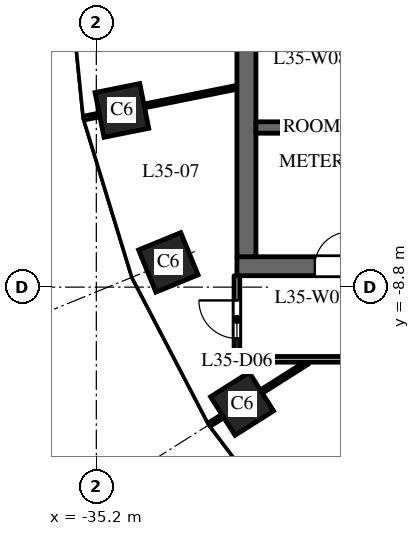
"""IFC4 building model, lengths in metres.
Left out: names, types, materials, properties, quantities, classifications, styles, units other than length and angle.
Written with IfcOpenShell. Run it as: python <this file> out.ifc"""

import sys

from ifc_helpers import new_model, si_unit, direction, frame, frame_2d, origin, origin_2d, place, context, subcontext, project, spatial, rectangle, extrude, element, fill, save


model = new_model("IFC4")
c1 = context("Model", 3, precision=1e-05, world=origin(), true_north=direction((0.0, 1.0)))
c2 = subcontext(c1, "Body", "Model", "MODEL_VIEW")
j1 = project(units=[si_unit("LENGTHUNIT", "METRE"), si_unit("PLANEANGLEUNIT", "RADIAN")], contexts=[c1])
p1 = place(None, origin())
s1 = spatial("IfcSite", under=j1, at=p1, CompositionType="ELEMENT")
p2 = place(p1, origin())
s2 = spatial("IfcBuilding", under=s1, at=p2, CompositionType="ELEMENT")
p3 = place(p2, frame((0.0, 0.0, 154.0)))
s3 = spatial("IfcBuildingStorey", under=s2, at=p3, CompositionType="ELEMENT", Elevation=154.0)
for number, where, z_axis, x_axis in (
    (1, (-34.527, -4.151, 0.0), (0.0, 0.0, 1.0), (0.197, -0.98, 0.0)),
    (2, (-33.305, -8.149, 0.0), (0.0, 0.0, 1.0), (0.379, -0.925, 0.0)),
    (3, (-31.365, -11.871, 0.0), (0.0, 0.0, 1.0), (0.535, -0.845, 0.0)),
):
    element("IfcColumn", number, at=place(p3, frame(where, z_axis=z_axis, x_axis=x_axis)), inside=s3, PredefinedType="COLUMN", context=c2, shape_type="SweptSolid", body=[
        extrude(rectangle(XDim=1.2, YDim=1.2, at=origin_2d()), origin(), (0.0, 0.0, 1.0), 4.0),
    ])
p4 = place(p3, frame((-16.5, -8.25, 0.0), z_axis=(0.0, 0.0, 1.0), x_axis=(-1.0, 0.0, 0.0)))
e4 = element("IfcWall", 4, at=p4, inside=s3, PredefinedType="SHEAR", context=c2, shape_type="SweptSolid", body=[
    extrude(rectangle(XDim=15.0, YDim=0.5, at=frame_2d((7.5, 0.0))), origin(), (0.0, 0.0, 1.0), 3.7),
])
p5 = place(p4, frame((6.9, 0.0, 0.0)))
e5 = element("IfcOpeningElement", 5, at=p5, cuts=e4, PredefinedType="OPENING", context=c2, shape_type="SweptSolid", body=[
    extrude(rectangle(XDim=1.2, YDim=2.1, at=frame_2d((0.6, 1.05))), frame((0.0, 0.26, 0.0), z_axis=(0.0, -1.0, 0.0), x_axis=(1.0, 0.0, 0.0)), (0.0, 0.0, 1.0), 0.52),
])
p6 = place(p4, frame((12.05, 0.0, 0.0)))
e6 = element("IfcOpeningElement", 6, at=p6, cuts=e4, PredefinedType="OPENING", context=c2, shape_type="SweptSolid", body=[
    extrude(rectangle(XDim=0.9, YDim=2.1, at=frame_2d((0.45, 1.05))), frame((0.0, 0.26, 0.0), z_axis=(0.0, -1.0, 0.0), x_axis=(1.0, 0.0, 0.0)), (0.0, 0.0, 1.0), 0.52),
])
p7 = place(p3, frame((-31.25, -8.0, 0.0), z_axis=(0.0, 0.0, 1.0), x_axis=(0.0, 1.0, 0.0)))
e7 = element("IfcWall", 7, at=p7, inside=s3, PredefinedType="SHEAR", context=c2, shape_type="SweptSolid", body=[
    extrude(rectangle(XDim=16.0, YDim=0.5, at=frame_2d((8.0, 0.0))), origin(), (0.0, 0.0, 1.0), 3.7),
])
p8 = place(p3, frame((-24.9, -4.6, 0.0), z_axis=(0.0, 0.0, 1.0), x_axis=(-1.0, 0.0, 0.0)))
e8 = element("IfcWall", 8, at=p8, inside=s3, PredefinedType="SHEAR", context=c2, shape_type="SweptSolid", body=[
    extrude(rectangle(XDim=6.1, YDim=0.3, at=frame_2d((3.05, 0.0))), origin(), (0.0, 0.0, 1.0), 3.7),
])
p9 = place(p3, frame((-35.512, -4.349, 0.0), z_axis=(0.0, 0.0, 1.0), x_axis=(0.980357474535, 0.197228857227, 0.0)))
e9 = element("IfcWall", 9, at=p9, inside=s3, PredefinedType="PARTITIONING", context=c2, shape_type="SweptSolid", body=[
    extrude(rectangle(XDim=4.092, YDim=0.1, at=frame_2d((2.046, 0.0))), origin(), (0.0, 0.0, 1.0), 3.2),
])
p10 = place(p3, frame((-32.212, -12.408, 0.0), z_axis=(0.0, 0.0, 1.0), x_axis=(0.844810627195, 0.535065420467, 0.0)))
e10 = element("IfcWall", 10, at=p10, inside=s3, PredefinedType="PARTITIONING", context=c2, shape_type="SweptSolid", body=[
    extrude(rectangle(XDim=3.048, YDim=0.1, at=frame_2d((1.524, 0.0))), origin(), (0.0, 0.0, 1.0), 3.7),
])
p11 = place(p3, frame((-31.5, -10.7, 0.0), z_axis=(0.0, 0.0, 1.0), x_axis=(0.0, 1.0, 0.0)))
e11 = element("IfcWall", 11, at=p11, inside=s3, PredefinedType="PARTITIONING", context=c2, shape_type="SweptSolid", body=[
    extrude(rectangle(XDim=2.2, YDim=0.15, at=frame_2d((1.1, 0.0))), origin(), (0.0, 0.0, 1.0), 3.7),
])
p12 = place(p11, frame((0.55, 0.0, 0.0)))
e12 = element("IfcOpeningElement", 12, at=p12, cuts=e11, PredefinedType="OPENING", context=c2, shape_type="SweptSolid", body=[
    extrude(rectangle(XDim=1.0, YDim=2.1, at=frame_2d((0.5, 1.05))), frame((0.0, 0.085, 0.0), z_axis=(0.0, -1.0, 0.0), x_axis=(1.0, 0.0, 0.0)), (0.0, 0.0, 1.0), 0.17),
])
p13 = place(p3, frame((-31.5, -10.7, 0.0), z_axis=(0.0, 0.0, 1.0), x_axis=(1.0, 0.0, 0.0)))
e13 = element("IfcWall", 13, at=p13, inside=s3, PredefinedType="PARTITIONING", context=c2, shape_type="SweptSolid", body=[
    extrude(rectangle(XDim=7.361, YDim=0.15, at=frame_2d((3.681, 0.0))), origin(), (0.0, 0.0, 1.0), 3.1),
])
p14 = place(p13, frame((5.629, 0.0, 0.0)))
e14 = element("IfcOpeningElement", 14, at=p14, cuts=e13, PredefinedType="OPENING", context=c2, shape_type="SweptSolid", body=[
    extrude(rectangle(XDim=1.0, YDim=2.1, at=frame_2d((0.5, 1.05))), frame((0.0, 0.085, 0.0), z_axis=(0.0, -1.0, 0.0), x_axis=(1.0, 0.0, 0.0)), (0.0, 0.0, 1.0), 0.17),
])
p15 = place(p6, origin())
e15 = element("IfcDoor", 15, at=p15, inside=s3, OperationType="SINGLE_SWING_LEFT", PredefinedType="DOOR", context=c2, shape_type="SweptSolid", body=[
    extrude(rectangle(XDim=0.9, YDim=2.1, at=frame_2d((0.45, 1.05))), frame((0.0, 0.025, 0.0), z_axis=(0.0, -1.0, 0.0), x_axis=(1.0, 0.0, 0.0)), (0.0, 0.0, 1.0), 0.05),
])
fill(e6, e15)
p16 = place(p12, origin())
e16 = element("IfcDoor", 16, at=p16, inside=s3, OperationType="SINGLE_SWING_RIGHT", PredefinedType="DOOR", context=c2, shape_type="SweptSolid", body=[
    extrude(rectangle(XDim=1.0, YDim=2.1, at=frame_2d((0.5, 1.05))), frame((0.0, 0.025, 0.0), z_axis=(0.0, -1.0, 0.0), x_axis=(1.0, 0.0, 0.0)), (0.0, 0.0, 1.0), 0.05),
])
fill(e12, e16)
save(model, sys.argv[1])
